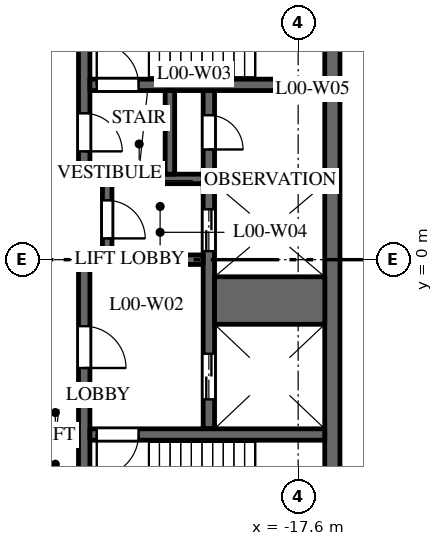
"""IFC4 building model, lengths in metres.
Left out: names, types, materials, properties, quantities, classifications, styles, units other than length and angle.
Written with IfcOpenShell. Run it as: python <this file> out.ifc"""

import sys

from ifc_helpers import new_model, si_unit, direction, frame, frame_2d, origin, place, context, subcontext, project, spatial, rectangle, extrude, element, fill, save


model = new_model("IFC4")
c1 = context("Model", 3, precision=1e-05, world=origin(), true_north=direction((0.0, 1.0)))
c2 = subcontext(c1, "Body", "Model", "MODEL_VIEW")
j1 = project(units=[si_unit("LENGTHUNIT", "METRE"), si_unit("PLANEANGLEUNIT", "RADIAN")], contexts=[c1])
p1 = place(None, origin())
s1 = spatial("IfcSite", under=j1, at=p1, CompositionType="ELEMENT")
p2 = place(p1, origin())
s2 = spatial("IfcBuilding", under=s1, at=p2, CompositionType="ELEMENT")
p3 = place(p2, origin())
s3 = spatial("IfcBuildingStorey", under=s2, at=p3, CompositionType="ELEMENT", Elevation=0.0)
p4 = place(p3, frame((-19.95, -4.45, 0.0), z_axis=(0.0, 0.0, 1.0), x_axis=(0.0, 1.0, 0.0)))
e1 = element("IfcWall", 1, at=p4, inside=s3, PredefinedType="SHEAR", context=c2, shape_type="SweptSolid", body=[
    extrude(rectangle(XDim=8.9, YDim=0.3, at=frame_2d((4.45, 0.0))), origin(), (0.0, 0.0, 1.0), 7.25),
])
p5 = place(p4, frame((0.775, 0.0, 0.0)))
e2 = element("IfcOpeningElement", 2, at=p5, cuts=e1, PredefinedType="OPENING", context=c2, shape_type="SweptSolid", body=[
    extrude(rectangle(XDim=1.2, YDim=2.1, at=frame_2d((0.6, 1.05))), frame((0.0, 0.16, 0.0), z_axis=(0.0, -1.0, 0.0), x_axis=(1.0, 0.0, 0.0)), (0.0, 0.0, 1.0), 0.32),
])
p6 = place(p4, frame((4.675, 0.0, 0.0)))
e3 = element("IfcOpeningElement", 3, at=p6, cuts=e1, PredefinedType="OPENING", context=c2, shape_type="SweptSolid", body=[
    extrude(rectangle(XDim=1.1, YDim=2.1, at=frame_2d((0.55, 1.05))), frame((0.0, 0.16, 0.0), z_axis=(0.0, -1.0, 0.0), x_axis=(1.0, 0.0, 0.0)), (0.0, 0.0, 1.0), 0.32),
])
p7 = place(p4, frame((7.35, 0.0, 0.0)))
e4 = element("IfcOpeningElement", 4, at=p7, cuts=e1, PredefinedType="OPENING", context=c2, shape_type="SweptSolid", body=[
    extrude(rectangle(XDim=0.9, YDim=2.1, at=frame_2d((0.45, 1.05))), frame((0.0, 0.16, 0.0), z_axis=(0.0, -1.0, 0.0), x_axis=(1.0, 0.0, 0.0)), (0.0, 0.0, 1.0), 0.32),
])
p8 = place(p3, frame((-20.1, 0.0, 0.0), z_axis=(0.0, 0.0, 1.0), x_axis=(-1.0, 0.0, 0.0)))
e5 = element("IfcWall", 5, at=p8, inside=s3, PredefinedType="SHEAR", context=c2, shape_type="SweptSolid", body=[
    extrude(rectangle(XDim=3.28, YDim=0.25, at=frame_2d((1.64, 0.0))), origin(), (0.0, 0.0, 1.0), 7.25),
])
p9 = place(p3, frame((-16.7, -8.0, 0.0), z_axis=(0.0, 0.0, 1.0), x_axis=(0.0, 1.0, 0.0)))
e6 = element("IfcWall", 6, at=p9, inside=s3, PredefinedType="SHEAR", context=c2, shape_type="SweptSolid", body=[
    extrude(rectangle(XDim=16.0, YDim=0.4, at=frame_2d((8.0, 0.0))), origin(), (0.0, 0.0, 1.0), 7.25),
])
p10 = place(p3, frame((-22.625, 0.125, 0.0), z_axis=(0.0, 0.0, 1.0), x_axis=(0.0, 1.0, 0.0)))
e7 = element("IfcWall", 7, at=p10, inside=s3, PredefinedType="SHEAR", context=c2, shape_type="SweptSolid", body=[
    extrude(rectangle(XDim=1.875, YDim=0.25, at=frame_2d((0.938, 0.0))), origin(), (0.0, 0.0, 1.0), 7.25),
])
p11 = place(p10, frame((0.435, 0.0, 0.0)))
e8 = element("IfcOpeningElement", 8, at=p11, cuts=e7, PredefinedType="OPENING", context=c2, shape_type="SweptSolid", body=[
    extrude(rectangle(XDim=1.0, YDim=2.1, at=frame_2d((0.5, 1.05))), frame((0.0, 0.135, 0.0), z_axis=(0.0, -1.0, 0.0), x_axis=(1.0, 0.0, 0.0)), (0.0, 0.0, 1.0), 0.27),
])
p12 = place(p3, frame((-16.9, -1.075, 0.0), z_axis=(0.0, 0.0, 1.0), x_axis=(-1.0, 0.0, 0.0)))
e9 = element("IfcWall", 9, at=p12, inside=s3, PredefinedType="SHEAR", context=c2, shape_type="SweptSolid", body=[
    extrude(rectangle(XDim=2.9, YDim=1.25, at=frame_2d((1.45, 0.0))), origin(), (0.0, 0.0, 1.0), 7.25),
])
p13 = place(p3, frame((-16.9, 2.125, 0.0), z_axis=(0.0, 0.0, 1.0), x_axis=(-1.0, 0.0, 0.0)))
e10 = element("IfcWall", 10, at=p13, inside=s3, PredefinedType="SHEAR", context=c2, shape_type="SweptSolid", body=[
    extrude(rectangle(XDim=2.9, YDim=0.25, at=frame_2d((1.45, 0.0))), origin(), (0.0, 0.0, 1.0), 7.25),
])
p14 = place(p3, frame((-23.23, 2.25, 0.0), z_axis=(0.0, 0.0, 1.0), x_axis=(0.0, 1.0, 0.0)))
e11 = element("IfcWall", 11, at=p14, inside=s3, PredefinedType="SHEAR", context=c2, shape_type="SweptSolid", body=[
    extrude(rectangle(XDim=5.75, YDim=0.3, at=frame_2d((2.875, 0.0))), origin(), (0.0, 0.0, 1.0), 7.25),
])
p15 = place(p14, frame((0.6, 0.0, 0.0)))
e12 = element("IfcOpeningElement", 12, at=p15, cuts=e11, PredefinedType="OPENING", context=c2, shape_type="SweptSolid", body=[
    extrude(rectangle(XDim=1.0, YDim=2.1, at=frame_2d((0.5, 1.05))), frame((0.0, 0.16, 0.0), z_axis=(0.0, -1.0, 0.0), x_axis=(1.0, 0.0, 0.0)), (0.0, 0.0, 1.0), 0.32),
])
p16 = place(p3, frame((-23.23, -8.0, 0.0), z_axis=(0.0, 0.0, 1.0), x_axis=(0.0, 1.0, 0.0)))
e13 = element("IfcWall", 13, at=p16, inside=s3, PredefinedType="SHEAR", context=c2, shape_type="SweptSolid", body=[
    extrude(rectangle(XDim=7.875, YDim=0.3, at=frame_2d((3.938, 0.0))), origin(), (0.0, 0.0, 1.0), 7.25),
])
p17 = place(p16, frame((5.15, 0.0, 0.0)))
e14 = element("IfcOpeningElement", 14, at=p17, cuts=e13, PredefinedType="OPENING", context=c2, shape_type="SweptSolid", body=[
    extrude(rectangle(XDim=1.1, YDim=2.1, at=frame_2d((0.55, 1.05))), frame((0.0, 0.16, 0.0), z_axis=(0.0, -1.0, 0.0), x_axis=(1.0, 0.0, 0.0)), (0.0, 0.0, 1.0), 0.32),
])
p18 = place(p3, frame((-16.9, 4.6, 0.0), z_axis=(0.0, 0.0, 1.0), x_axis=(-1.0, 0.0, 0.0)))
e15 = element("IfcWall", 15, at=p18, inside=s3, PredefinedType="SHEAR", context=c2, shape_type="SweptSolid", body=[
    extrude(rectangle(XDim=6.18, YDim=0.3, at=frame_2d((3.09, 0.0))), origin(), (0.0, 0.0, 1.0), 7.25),
])
p19 = place(p18, frame((4.9, 0.0, 0.0)))
e16 = element("IfcOpeningElement", 16, at=p19, cuts=e15, PredefinedType="OPENING", context=c2, shape_type="SweptSolid", body=[
    extrude(rectangle(XDim=1.1, YDim=2.1, at=frame_2d((0.55, 1.05))), frame((0.0, 0.16, 0.0), z_axis=(0.0, -1.0, 0.0), x_axis=(1.0, 0.0, 0.0)), (0.0, 0.0, 1.0), 0.32),
])
p20 = place(p3, frame((-16.9, -4.6, 0.0), z_axis=(0.0, 0.0, 1.0), x_axis=(-1.0, 0.0, 0.0)))
e17 = element("IfcWall", 17, at=p20, inside=s3, PredefinedType="SHEAR", context=c2, shape_type="SweptSolid", body=[
    extrude(rectangle(XDim=6.18, YDim=0.3, at=frame_2d((3.09, 0.0))), origin(), (0.0, 0.0, 1.0), 7.25),
])
p21 = place(p20, frame((4.9, 0.0, 0.0)))
e18 = element("IfcOpeningElement", 18, at=p21, cuts=e17, PredefinedType="OPENING", context=c2, shape_type="SweptSolid", body=[
    extrude(rectangle(XDim=1.1, YDim=2.1, at=frame_2d((0.55, 1.05))), frame((0.0, 0.16, 0.0), z_axis=(0.0, -1.0, 0.0), x_axis=(1.0, 0.0, 0.0)), (0.0, 0.0, 1.0), 0.32),
])
p22 = place(p3, frame((-20.1, 2.125, 0.0), z_axis=(0.0, 0.0, 1.0), x_axis=(-1.0, 0.0, 0.0)))
e19 = element("IfcWall", 19, at=p22, inside=s3, PredefinedType="SHEAR", context=c2, shape_type="SweptSolid", body=[
    extrude(rectangle(XDim=3.28, YDim=0.25, at=frame_2d((1.64, 0.0))), origin(), (0.0, 0.0, 1.0), 7.25),
])
p23 = place(p3, frame((-20.975, 2.25, 0.0), z_axis=(0.0, 0.0, 1.0), x_axis=(0.0, 1.0, 0.0)))
e20 = element("IfcWall", 20, at=p23, inside=s3, PredefinedType="SHEAR", context=c2, shape_type="SweptSolid", body=[
    extrude(rectangle(XDim=2.2, YDim=0.25, at=frame_2d((1.1, 0.0))), origin(), (0.0, 0.0, 1.0), 7.25),
])
p24 = place(p5, origin())
e21 = element("IfcDoor", 21, at=p24, inside=s3, OperationType="DOUBLE_DOOR_SLIDING", PredefinedType="DOOR", context=c2, shape_type="SweptSolid", body=[
    extrude(rectangle(XDim=1.2, YDim=2.1, at=frame_2d((0.6, 1.05))), frame((0.0, 0.025, 0.0), z_axis=(0.0, -1.0, 0.0), x_axis=(1.0, 0.0, 0.0)), (0.0, 0.0, 1.0), 0.05),
])
fill(e2, e21)
p25 = place(p6, origin())
e22 = element("IfcDoor", 22, at=p25, inside=s3, OperationType="DOUBLE_DOOR_SLIDING", PredefinedType="DOOR", context=c2, shape_type="SweptSolid", body=[
    extrude(rectangle(XDim=1.1, YDim=2.1, at=frame_2d((0.55, 1.05))), frame((0.0, 0.025, 0.0), z_axis=(0.0, -1.0, 0.0), x_axis=(1.0, 0.0, 0.0)), (0.0, 0.0, 1.0), 0.05),
])
fill(e3, e22)
p26 = place(p19, origin())
e23 = element("IfcDoor", 23, at=p26, inside=s3, OperationType="SINGLE_SWING_RIGHT", PredefinedType="DOOR", context=c2, shape_type="SweptSolid", body=[
    extrude(rectangle(XDim=1.1, YDim=2.1, at=frame_2d((0.55, 1.05))), frame((0.0, 0.025, 0.0), z_axis=(0.0, -1.0, 0.0), x_axis=(1.0, 0.0, 0.0)), (0.0, 0.0, 1.0), 0.05),
])
fill(e16, e23)
p27 = place(p21, origin())
e24 = element("IfcDoor", 24, at=p27, inside=s3, OperationType="SINGLE_SWING_LEFT", PredefinedType="DOOR", context=c2, shape_type="SweptSolid", body=[
    extrude(rectangle(XDim=1.1, YDim=2.1, at=frame_2d((0.55, 1.05))), frame((0.0, 0.025, 0.0), z_axis=(0.0, -1.0, 0.0), x_axis=(1.0, 0.0, 0.0)), (0.0, 0.0, 1.0), 0.05),
])
fill(e18, e24)
p28 = place(p17, origin())
e25 = element("IfcDoor", 25, at=p28, inside=s3, OperationType="SINGLE_SWING_LEFT", PredefinedType="DOOR", context=c2, shape_type="SweptSolid", body=[
    extrude(rectangle(XDim=1.1, YDim=2.1, at=frame_2d((0.55, 1.05))), frame((0.0, 0.025, 0.0), z_axis=(0.0, -1.0, 0.0), x_axis=(1.0, 0.0, 0.0)), (0.0, 0.0, 1.0), 0.05),
])
fill(e14, e25)
p29 = place(p15, origin())
e26 = element("IfcDoor", 26, at=p29, inside=s3, OperationType="SINGLE_SWING_LEFT", PredefinedType="DOOR", context=c2, shape_type="SweptSolid", body=[
    extrude(rectangle(XDim=1.0, YDim=2.1, at=frame_2d((0.5, 1.05))), frame((0.0, 0.025, 0.0), z_axis=(0.0, -1.0, 0.0), x_axis=(1.0, 0.0, 0.0)), (0.0, 0.0, 1.0), 0.05),
])
fill(e12, e26)
p30 = place(p11, origin())
e27 = element("IfcDoor", 27, at=p30, inside=s3, OperationType="SINGLE_SWING_LEFT", PredefinedType="DOOR", context=c2, shape_type="SweptSolid", body=[
    extrude(rectangle(XDim=1.0, YDim=2.1, at=frame_2d((0.5, 1.05))), frame((0.0, 0.025, 0.0), z_axis=(0.0, -1.0, 0.0), x_axis=(1.0, 0.0, 0.0)), (0.0, 0.0, 1.0), 0.05),
])
fill(e8, e27)
p31 = place(p7, origin())
e28 = element("IfcDoor", 28, at=p31, inside=s3, OperationType="SINGLE_SWING_LEFT", PredefinedType="DOOR", context=c2, shape_type="SweptSolid", body=[
    extrude(rectangle(XDim=0.9, YDim=2.1, at=frame_2d((0.45, 1.05))), frame((0.0, 0.025, 0.0), z_axis=(0.0, -1.0, 0.0), x_axis=(1.0, 0.0, 0.0)), (0.0, 0.0, 1.0), 0.05),
])
fill(e4, e28)
save(model, sys.argv[1])
